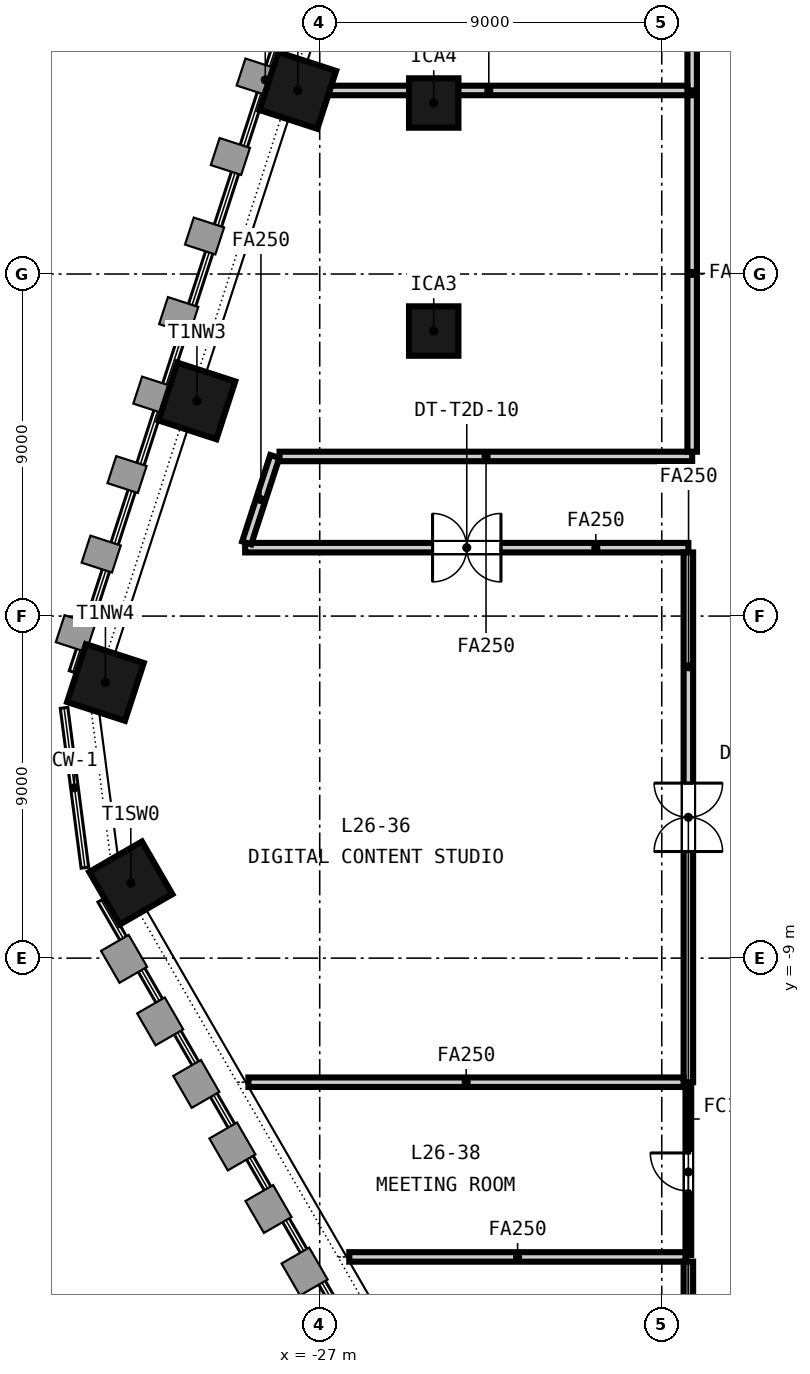
"""IFC4 building model, lengths in metres.
Left out: names, types, materials, properties, quantities, classifications, styles, units other than length and angle.
Written with IfcOpenShell. Run it as: python <this file> out.ifc"""

import sys

from ifc_helpers import new_model, si_unit, direction, frame, frame_2d, origin, origin_2d, place, context, subcontext, project, spatial, rectangle, extrude, element, fill, save


model = new_model("IFC4")
c1 = context("Model", 3, precision=1e-05, world=origin(), true_north=direction((0.0, 1.0)))
c2 = subcontext(c1, "Body", "Model", "MODEL_VIEW")
j1 = project(units=[si_unit("LENGTHUNIT", "METRE"), si_unit("PLANEANGLEUNIT", "RADIAN")], contexts=[c1])
p1 = place(None, origin())
s1 = spatial("IfcSite", under=j1, at=p1, CompositionType="ELEMENT")
p2 = place(p1, origin())
s2 = spatial("IfcBuilding", under=s1, at=p2, CompositionType="ELEMENT")
p3 = place(p2, frame((0.0, 0.0, 109.85)))
s3 = spatial("IfcBuildingStorey", under=s2, at=p3, CompositionType="ELEMENT", Elevation=109.85)
for number, where, z_axis, x_axis in (
    (1, (-27.577, 13.83, -0.15), (0.0, 0.0, 1.0), (-0.309, -0.951, 0.0)),
    (2, (-30.231, 5.661, -0.15), (0.0, 0.0, 1.0), (-0.309, -0.951, 0.0)),
    (3, (-32.638, -1.747, -0.15), (0.0, 0.0, 1.0), (-0.309, -0.951, 0.0)),
    (4, (-31.971, -7.025, -0.15), (0.0, 0.0, 1.0), (0.5, -0.866, 0.0)),
):
    element("IfcColumn", number, at=place(p3, frame(where, z_axis=z_axis, x_axis=x_axis)), inside=s3, PredefinedType="COLUMN", context=c2, shape_type="SweptSolid", body=[
        extrude(rectangle(XDim=1.6, YDim=1.6, at=origin_2d()), origin(), (0.0, 0.0, 1.0), 3.65),
    ])
for number, where, z_axis, x_axis in (
    (5, (-24.0, 7.5, -0.15), (0.0, 0.0, 1.0), (1.0, 0.0, 0.0)),
    (6, (-24.0, 13.5, -0.15), (0.0, 0.0, 1.0), (1.0, 0.0, 0.0)),
):
    element("IfcColumn", number, at=place(p3, frame(where, z_axis=z_axis, x_axis=x_axis)), inside=s3, PredefinedType="COLUMN", context=c2, shape_type="SweptSolid", body=[
        extrude(rectangle(XDim=1.3, YDim=1.3, at=origin_2d()), origin(), (0.0, 0.0, 1.0), 3.65),
    ])
p4 = place(p3, frame((-17.3, 1.8, 0.0), z_axis=(0.0, 0.0, 1.0), x_axis=(-1.0, 0.0, 0.0)))
e7 = element("IfcWall", 7, at=p4, inside=s3, PredefinedType="PARTITIONING", context=c2, shape_type="SweptSolid", body=[
    extrude(rectangle(XDim=11.662, YDim=0.25, at=frame_2d((5.831, 0.0))), origin(), (0.0, 0.0, 1.0), 2.741),
])
p5 = place(p4, frame((4.931, 0.0, 0.0)))
e8 = element("IfcOpeningElement", 8, at=p5, cuts=e7, PredefinedType="OPENING", context=c2, shape_type="SweptSolid", body=[
    extrude(rectangle(XDim=1.8, YDim=2.1, at=frame_2d((0.9, 1.05))), frame((0.0, 0.135, 0.0), z_axis=(0.0, -1.0, 0.0), x_axis=(1.0, 0.0, 0.0)), (0.0, 0.0, 1.0), 0.27),
])
p6 = place(p3, frame((-17.2, 13.83, 0.0), z_axis=(0.0, 0.0, 1.0), x_axis=(0.0, 1.0, 0.0)))
e9 = element("IfcWall", 9, at=p6, inside=s3, PredefinedType="PARTITIONING", context=c2, shape_type="SweptSolid", body=[
    extrude(rectangle(XDim=4.97, YDim=0.25, at=frame_2d((2.485, 0.0))), origin(), (0.0, 0.0, 1.0), 2.741),
])
p7 = place(p3, frame((-27.787, 13.83, 0.0), z_axis=(0.0, 0.0, 1.0), x_axis=(1.0, 0.0, 0.0)))
e10 = element("IfcWall", 10, at=p7, inside=s3, PredefinedType="PARTITIONING", context=c2, shape_type="SweptSolid", body=[
    extrude(rectangle(XDim=10.462, YDim=0.25, at=frame_2d((5.231, 0.0))), origin(), (0.0, 0.0, 1.0), 2.741),
])
p8 = place(p3, frame((-28.921, 1.925, 0.0), z_axis=(0.0, 0.0, 1.0), x_axis=(0.309146074309, 0.951014565998, 0.0)))
e11 = element("IfcWall", 11, at=p8, inside=s3, PredefinedType="PARTITIONING", context=c2, shape_type="SweptSolid", body=[
    extrude(rectangle(XDim=2.392, YDim=0.25, at=frame_2d((1.196, 0.0))), origin(), (0.0, 0.0, 1.0), 2.741),
])
p9 = place(p3, frame((-28.057, 4.2, 0.0), z_axis=(0.0, 0.0, 1.0), x_axis=(1.0, 0.0, 0.0)))
e12 = element("IfcWall", 12, at=p9, inside=s3, PredefinedType="PARTITIONING", context=c2, shape_type="SweptSolid", body=[
    extrude(rectangle(XDim=10.857, YDim=0.25, at=frame_2d((5.428, 0.0))), origin(), (0.0, 0.0, 1.0), 2.741),
])
p10 = place(p3, frame((-17.2, 4.325, 0.0), z_axis=(0.0, 0.0, 1.0), x_axis=(0.0, 1.0, 0.0)))
e13 = element("IfcWall", 13, at=p10, inside=s3, PredefinedType="PARTITIONING", context=c2, shape_type="SweptSolid", body=[
    extrude(rectangle(XDim=9.38, YDim=0.25, at=frame_2d((4.69, 0.0))), origin(), (0.0, 0.0, 1.0), 2.741),
])
p11 = place(p3, frame((-17.3, -12.265, 0.0), z_axis=(0.0, 0.0, 1.0), x_axis=(0.0, 1.0, 0.0)))
e14 = element("IfcWall", 14, at=p11, inside=s3, PredefinedType="PARTITIONING", context=c2, shape_type="SweptSolid", body=[
    extrude(rectangle(XDim=13.94, YDim=0.25, at=frame_2d((6.97, 0.0))), origin(), (0.0, 0.0, 1.0), 2.741),
])
p12 = place(p11, frame((6.07, 0.0, 0.0)))
e15 = element("IfcOpeningElement", 15, at=p12, cuts=e14, PredefinedType="OPENING", context=c2, shape_type="SweptSolid", body=[
    extrude(rectangle(XDim=1.8, YDim=2.1, at=frame_2d((0.9, 1.05))), frame((0.0, 0.135, 0.0), z_axis=(0.0, -1.0, 0.0), x_axis=(1.0, 0.0, 0.0)), (0.0, 0.0, 1.0), 0.27),
])
p13 = place(p3, frame((-28.876, -12.265, 0.0), z_axis=(0.0, 0.0, 1.0), x_axis=(1.0, 0.0, 0.0)))
e16 = element("IfcWall", 16, at=p13, inside=s3, PredefinedType="PARTITIONING", context=c2, shape_type="SweptSolid", body=[
    extrude(rectangle(XDim=11.451, YDim=0.25, at=frame_2d((5.726, 0.0))), origin(), (0.0, 0.0, 1.0), 2.741),
])
p14 = place(p3, frame((-17.3, -16.812, 0.0), z_axis=(0.0, 0.0, 1.0), x_axis=(0.0, 1.0, 0.0)))
e17 = element("IfcWall", 17, at=p14, inside=s3, PredefinedType="PARTITIONING", context=c2, shape_type="SweptSolid", body=[
    extrude(rectangle(XDim=4.422, YDim=0.15, at=frame_2d((2.211, 0.0))), origin(), (0.0, 0.0, 1.0), 2.741),
])
p15 = place(p14, frame((1.686, 0.0, 0.0)))
e18 = element("IfcOpeningElement", 18, at=p15, cuts=e17, PredefinedType="OPENING", context=c2, shape_type="SweptSolid", body=[
    extrude(rectangle(XDim=1.0, YDim=2.1, at=frame_2d((0.5, 1.05))), frame((0.0, 0.085, 0.0), z_axis=(0.0, -1.0, 0.0), x_axis=(1.0, 0.0, 0.0)), (0.0, 0.0, 1.0), 0.17),
])
p16 = place(p3, frame((-26.222, -16.862, 0.0), z_axis=(0.0, 0.0, 1.0), x_axis=(1.0, 0.0, 0.0)))
e19 = element("IfcWall", 19, at=p16, inside=s3, PredefinedType="PARTITIONING", context=c2, shape_type="SweptSolid", body=[
    extrude(rectangle(XDim=8.847, YDim=0.25, at=frame_2d((4.423, 0.0))), origin(), (0.0, 0.0, 1.0), 2.741),
])
p17 = place(p3, frame((-17.3, -20.275, 0.0), z_axis=(0.0, 0.0, 1.0), x_axis=(0.0, 1.0, 0.0)))
e20 = element("IfcWall", 20, at=p17, inside=s3, PredefinedType="PARTITIONING", context=c2, shape_type="SweptSolid", body=[
    extrude(rectangle(XDim=3.288, YDim=0.25, at=frame_2d((1.644, 0.0))), origin(), (0.0, 0.0, 1.0), 2.741),
])
p18 = place(p12, origin())
e21 = element("IfcDoor", 21, at=p18, inside=s3, OperationType="DOUBLE_DOOR_DOUBLE_SWING", PredefinedType="DOOR", context=c2, shape_type="SweptSolid", body=[
    extrude(rectangle(XDim=1.8, YDim=2.1, at=frame_2d((0.9, 1.05))), frame((0.0, 0.025, 0.0), z_axis=(0.0, -1.0, 0.0), x_axis=(1.0, 0.0, 0.0)), (0.0, 0.0, 1.0), 0.05),
])
fill(e15, e21)
p19 = place(p5, origin())
e22 = element("IfcDoor", 22, at=p19, inside=s3, OperationType="DOUBLE_DOOR_DOUBLE_SWING", PredefinedType="DOOR", context=c2, shape_type="SweptSolid", body=[
    extrude(rectangle(XDim=1.8, YDim=2.1, at=frame_2d((0.9, 1.05))), frame((0.0, 0.025, 0.0), z_axis=(0.0, -1.0, 0.0), x_axis=(1.0, 0.0, 0.0)), (0.0, 0.0, 1.0), 0.05),
])
fill(e8, e22)
p20 = place(p15, origin())
e23 = element("IfcDoor", 23, at=p20, inside=s3, OperationType="SINGLE_SWING_RIGHT", PredefinedType="DOOR", context=c2, shape_type="SweptSolid", body=[
    extrude(rectangle(XDim=1.0, YDim=2.1, at=frame_2d((0.5, 1.05))), frame((0.0, 0.025, 0.0), z_axis=(0.0, -1.0, 0.0), x_axis=(1.0, 0.0, 0.0)), (0.0, 0.0, 1.0), 0.05),
])
fill(e18, e23)
save(model, sys.argv[1])
